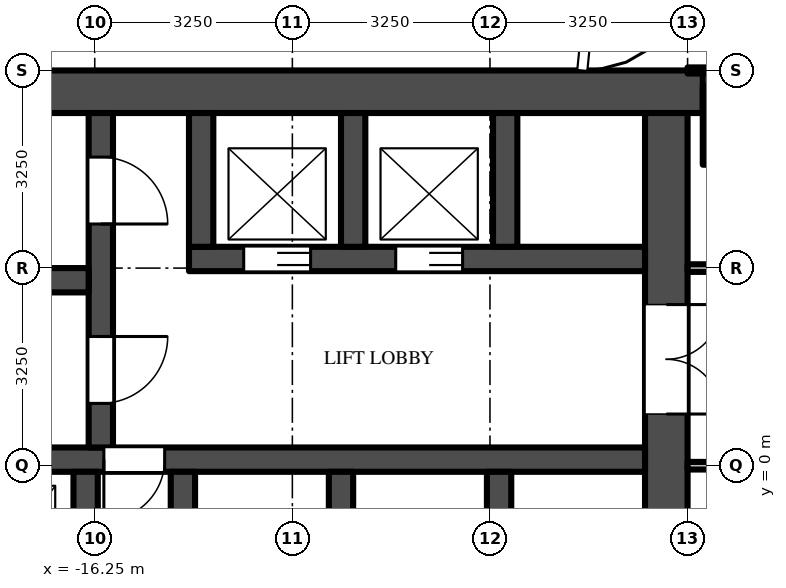
"""IFC4 building model, lengths in metres.
Left out: names, types, materials, properties, quantities, classifications, styles, units other than length and angle.
Written with IfcOpenShell. Run it as: python <this file> out.ifc"""

import sys

from ifc_helpers import new_model, si_unit, direction, frame, frame_2d, origin, origin_2d, place, context, subcontext, project, spatial, rectangle, extrude, source, transform, mapped, element, fill, save


model = new_model("IFC4")
c1 = context("Model", 3, precision=1e-05, world=origin(), true_north=direction((0.0, 1.0)))
c2 = subcontext(c1, "Body", "Model", "MODEL_VIEW")
j1 = project(units=[si_unit("LENGTHUNIT", "METRE"), si_unit("PLANEANGLEUNIT", "RADIAN")], contexts=[c1])
p1 = place(None, origin())
s1 = spatial("IfcSite", under=j1, at=p1, CompositionType="ELEMENT")
p2 = place(p1, origin())
s2 = spatial("IfcBuilding", under=s1, at=p2, CompositionType="ELEMENT")
p3 = place(p2, frame((0.0, 0.0, 102.0)))
s3 = spatial("IfcBuildingStorey", under=s2, at=p3, CompositionType="ELEMENT", Elevation=102.0)
m1 = source(origin(), c2, "Body", "SweptSolid", [
    extrude(rectangle(XDim=1.3, YDim=1.3, at=origin_2d()), origin(), (0.0, 0.0, 1.0), 4.5),
])
p4 = place(p3, frame((-5.6, 5.6, 0.0), z_axis=(0.0, 0.0, 1.0), x_axis=(1.0, 0.0, 0.0)))
e1 = element("IfcColumn", 1, at=p4, inside=s3, PredefinedType="COLUMN", context=c2, shape_type="MappedRepresentation", body=[
    mapped(m1, transform((0.0, 0.0, 0.0))),
])
m2 = source(origin(), c2, "Body", "SweptSolid", [
    extrude(rectangle(XDim=16.5, YDim=0.7, at=frame_2d((8.25, 0.0))), origin(), (0.0, 0.0, 1.0), 4.25),
])
p5 = place(p3, frame((-6.25, 6.15, 0.0), z_axis=(0.0, 0.0, 1.0), x_axis=(-1.0, 0.0, 0.0)))
e2 = element("IfcWall", 2, at=p5, inside=s3, PredefinedType="SHEAR", context=c2, shape_type="MappedRepresentation", body=[
    mapped(m2, transform((0.0, 0.0, 0.0))),
])
m3 = source(origin(), c2, "Body", "SweptSolid", [
    extrude(rectangle(XDim=9.05, YDim=0.7, at=frame_2d((4.525, 0.0))), origin(), (0.0, 0.0, 1.0), 4.25),
])
p6 = place(p3, frame((-6.85, 5.8, 0.0), z_axis=(0.0, 0.0, 1.0), x_axis=(0.0, -1.0, 0.0)))
e3 = element("IfcWall", 3, at=p6, inside=s3, PredefinedType="SHEAR", context=c2, shape_type="MappedRepresentation", body=[
    mapped(m3, transform((0.0, 0.0, 0.0))),
])
m4 = source(origin(), c2, "Body", "SweptSolid", [
    extrude(rectangle(XDim=1.8, YDim=2.1, at=frame_2d((0.9, 1.05))), frame((0.0, 0.36, 0.0), z_axis=(0.0, -1.0, 0.0), x_axis=(1.0, 0.0, 0.0)), (0.0, 0.0, 1.0), 0.72),
])
p7 = place(p6, frame((3.15, 0.0, 0.0)))
e4 = element("IfcOpeningElement", 4, at=p7, cuts=e3, PredefinedType="OPENING", context=c2, shape_type="MappedRepresentation", body=[
    mapped(m4, transform((0.0, 0.0, 0.0))),
])
m5 = source(origin(), c2, "Body", "SweptSolid", [
    extrude(rectangle(XDim=7.5, YDim=0.4, at=frame_2d((3.75, 0.0))), origin(), (0.0, 0.0, 1.0), 4.25),
])
p8 = place(p3, frame((-7.2, 3.4, 0.0), z_axis=(0.0, 0.0, 1.0), x_axis=(-1.0, 0.0, 0.0)))
e5 = element("IfcWall", 5, at=p8, inside=s3, PredefinedType="SHEAR", context=c2, shape_type="MappedRepresentation", body=[
    mapped(m5, transform((0.0, 0.0, 0.0))),
])
m6 = source(origin(), c2, "Body", "SweptSolid", [
    extrude(rectangle(XDim=1.1, YDim=2.1, at=frame_2d((0.55, 1.05))), frame((0.0, 0.21, 0.0), z_axis=(0.0, -1.0, 0.0), x_axis=(1.0, 0.0, 0.0)), (0.0, 0.0, 1.0), 0.42),
])
p9 = place(p8, frame((3.0, 0.0, 0.0)))
e6 = element("IfcOpeningElement", 6, at=p9, cuts=e5, PredefinedType="OPENING", context=c2, shape_type="MappedRepresentation", body=[
    mapped(m6, transform((0.0, 0.0, 0.0))),
])
p10 = place(p8, frame((5.5, 0.0, 0.0)))
e7 = element("IfcOpeningElement", 7, at=p10, cuts=e5, PredefinedType="OPENING", context=c2, shape_type="MappedRepresentation", body=[
    mapped(m6, transform((0.0, 0.0, 0.0))),
])
m7 = source(origin(), c2, "Body", "SweptSolid", [
    extrude(rectangle(XDim=14.85, YDim=0.4, at=frame_2d((7.425, 0.0))), origin(), (0.0, 0.0, 1.0), 4.25),
])
p11 = place(p3, frame((-7.2, 0.1, 0.0), z_axis=(0.0, 0.0, 1.0), x_axis=(-1.0, 0.0, 0.0)))
e8 = element("IfcWall", 8, at=p11, inside=s3, PredefinedType="SHEAR", context=c2, shape_type="MappedRepresentation", body=[
    mapped(m7, transform((0.0, 0.0, 0.0))),
])
m8 = source(origin(), c2, "Body", "SweptSolid", [
    extrude(rectangle(XDim=1.0, YDim=2.1, at=frame_2d((0.5, 1.05))), frame((0.0, 0.21, 0.0), z_axis=(0.0, -1.0, 0.0), x_axis=(1.0, 0.0, 0.0)), (0.0, 0.0, 1.0), 0.42),
])
p12 = place(p11, frame((7.9, 0.0, 0.0)))
e9 = element("IfcOpeningElement", 9, at=p12, cuts=e8, PredefinedType="OPENING", context=c2, shape_type="MappedRepresentation", body=[
    mapped(m8, transform((0.0, 0.0, 0.0))),
])
m9 = source(origin(), c2, "Body", "SweptSolid", [
    extrude(rectangle(XDim=5.5, YDim=0.4, at=frame_2d((2.75, 0.0))), origin(), (0.0, 0.0, 1.0), 4.25),
])
p13 = place(p3, frame((-16.15, 5.8, 0.0), z_axis=(0.0, 0.0, 1.0), x_axis=(0.0, -1.0, 0.0)))
e10 = element("IfcWall", 10, at=p13, inside=s3, PredefinedType="SHEAR", context=c2, shape_type="MappedRepresentation", body=[
    mapped(m9, transform((0.0, 0.0, 0.0))),
])
p14 = place(p13, frame((0.725, 0.0, 0.0)))
e11 = element("IfcOpeningElement", 11, at=p14, cuts=e10, PredefinedType="OPENING", context=c2, shape_type="MappedRepresentation", body=[
    mapped(m6, transform((0.0, 0.0, 0.0))),
])
p15 = place(p13, frame((3.675, 0.0, 0.0)))
e12 = element("IfcOpeningElement", 12, at=p15, cuts=e10, PredefinedType="OPENING", context=c2, shape_type="MappedRepresentation", body=[
    mapped(m6, transform((0.0, 0.0, 0.0))),
])
m10 = source(origin(), c2, "Body", "SweptSolid", [
    extrude(rectangle(XDim=5.7, YDim=0.4, at=frame_2d((2.85, 0.0))), origin(), (0.0, 0.0, 1.0), 4.25),
])
p16 = place(p3, frame((-16.35, 3.05, 0.0), z_axis=(0.0, 0.0, 1.0), x_axis=(-1.0, 0.0, 0.0)))
e13 = element("IfcWall", 13, at=p16, inside=s3, PredefinedType="SHEAR", context=c2, shape_type="MappedRepresentation", body=[
    mapped(m10, transform((0.0, 0.0, 0.0))),
])
m11 = source(origin(), c2, "Body", "SweptSolid", [
    extrude(rectangle(XDim=2.2, YDim=0.4, at=frame_2d((1.1, 0.0))), origin(), (0.0, 0.0, 1.0), 4.25),
])
for number, where, z_axis, x_axis in (
    (14, (-9.5, 5.8, 0.0), (0.0, 0.0, 1.0), (0.0, -1.0, 0.0)),
    (15, (-12.0, 5.8, 0.0), (0.0, 0.0, 1.0), (0.0, -1.0, 0.0)),
    (16, (-14.5, 5.8, 0.0), (0.0, 0.0, 1.0), (0.0, -1.0, 0.0)),
):
    element("IfcWall", number, at=place(p3, frame(where, z_axis=z_axis, x_axis=x_axis)), inside=s3, PredefinedType="SHEAR", context=c2, shape_type="MappedRepresentation", body=[
        mapped(m11, transform((0.0, 0.0, 0.0))),
    ])
m12 = source(origin(), c2, "Body", "SweptSolid", [
    extrude(rectangle(XDim=2.45, YDim=0.4, at=frame_2d((1.225, 0.0))), origin(), (0.0, 0.0, 1.0), 4.25),
])
for number, where, z_axis, x_axis in (
    (17, (-9.6, -0.1, 0.0), (0.0, 0.0, 1.0), (0.0, -1.0, 0.0)),
    (18, (-12.2, -0.1, 0.0), (0.0, 0.0, 1.0), (0.0, -1.0, 0.0)),
    (19, (-14.8, -0.1, 0.0), (0.0, 0.0, 1.0), (0.0, -1.0, 0.0)),
    (20, (-16.4, -0.1, 0.0), (0.0, 0.0, 1.0), (0.0, -1.0, 0.0)),
):
    element("IfcWall", number, at=place(p3, frame(where, z_axis=z_axis, x_axis=x_axis)), inside=s3, PredefinedType="SHEAR", context=c2, shape_type="MappedRepresentation", body=[
        mapped(m12, transform((0.0, 0.0, 0.0))),
    ])
m13 = source(origin(), c2, "Body", "SweptSolid", [
    extrude(rectangle(XDim=5.363, YDim=0.125, at=frame_2d((2.681, 0.0))), origin(), (0.0, 0.0, 1.0), 3.468),
])
p17 = place(p3, frame((-1.137, 0.0, 0.0), z_axis=(0.0, 0.0, 1.0), x_axis=(-1.0, 0.0, 0.0)))
e21 = element("IfcWall", 21, at=p17, inside=s3, PredefinedType="PARTITIONING", context=c2, shape_type="MappedRepresentation", body=[
    mapped(m13, transform((0.0, 0.0, 0.0))),
])
p18 = place(p3, frame((-6.5, 3.25, 0.0), z_axis=(0.0, 0.0, 1.0), x_axis=(1.0, 0.0, 0.0)))
e22 = element("IfcWall", 22, at=p18, inside=s3, PredefinedType="PARTITIONING", context=c2, shape_type="MappedRepresentation", body=[
    mapped(m13, transform((0.0, 0.0, 0.0))),
])
m14 = source(origin(), c2, "Body", "SweptSolid", [
    extrude(rectangle(XDim=1.0, YDim=2.1, at=frame_2d((0.5, 1.05))), frame((0.0, 0.073, 0.0), z_axis=(0.0, -1.0, 0.0), x_axis=(1.0, 0.0, 0.0)), (0.0, 0.0, 1.0), 0.145),
])
p19 = place(p18, frame((3.95, 0.0, 0.0)))
e23 = element("IfcOpeningElement", 23, at=p19, cuts=e22, PredefinedType="OPENING", context=c2, shape_type="MappedRepresentation", body=[
    mapped(m14, transform((0.0, 0.0, 0.0))),
])
m15 = source(origin(), c2, "Body", "SweptSolid", [
    extrude(rectangle(XDim=5.363, YDim=0.1, at=frame_2d((2.681, 0.0))), origin(), (0.0, 0.0, 1.0), 3.33),
])
p20 = place(p3, frame((-6.5, 6.5, 0.0), z_axis=(0.0, 0.0, 1.0), x_axis=(1.0, 0.0, 0.0)))
e24 = element("IfcWall", 24, at=p20, inside=s3, PredefinedType="PARTITIONING", context=c2, shape_type="MappedRepresentation", body=[
    mapped(m15, transform((0.0, 0.0, 0.0))),
])
m16 = source(origin(), c2, "Body", "SweptSolid", [
    extrude(rectangle(XDim=1.1, YDim=2.1, at=frame_2d((0.55, 1.05))), frame((0.0, 0.025, 0.0), z_axis=(0.0, -1.0, 0.0), x_axis=(1.0, 0.0, 0.0)), (0.0, 0.0, 1.0), 0.05),
])
p21 = place(p9, origin())
e25 = element("IfcDoor", 25, at=p21, inside=s3, OperationType="DOUBLE_DOOR_SLIDING", PredefinedType="DOOR", context=c2, shape_type="MappedRepresentation", body=[
    mapped(m16, transform((0.0, 0.0, 0.0))),
])
fill(e6, e25)
p22 = place(p10, origin())
e26 = element("IfcDoor", 26, at=p22, inside=s3, OperationType="DOUBLE_DOOR_SLIDING", PredefinedType="DOOR", context=c2, shape_type="MappedRepresentation", body=[
    mapped(m16, transform((0.0, 0.0, 0.0))),
])
fill(e7, e26)
m17 = source(origin(), c2, "Body", "SweptSolid", [
    extrude(rectangle(XDim=1.8, YDim=2.1, at=frame_2d((0.9, 1.05))), frame((0.0, -0.275, 0.0), z_axis=(0.0, -1.0, 0.0), x_axis=(1.0, 0.0, 0.0)), (0.0, 0.0, 1.0), 0.05),
])
p23 = place(p7, origin())
e27 = element("IfcDoor", 27, at=p23, inside=s3, OperationType="DOUBLE_DOOR_SINGLE_SWING", PredefinedType="DOOR", context=c2, shape_type="MappedRepresentation", body=[
    mapped(m17, transform((0.0, 0.0, 0.0))),
])
fill(e4, e27)
p24 = place(p14, origin())
e28 = element("IfcDoor", 28, at=p24, inside=s3, OperationType="SINGLE_SWING_RIGHT", PredefinedType="DOOR", context=c2, shape_type="MappedRepresentation", body=[
    mapped(m16, transform((0.0, 0.0, 0.0))),
])
fill(e11, e28)
p25 = place(p15, origin())
e29 = element("IfcDoor", 29, at=p25, inside=s3, OperationType="SINGLE_SWING_LEFT", PredefinedType="DOOR", context=c2, shape_type="MappedRepresentation", body=[
    mapped(m16, transform((0.0, 0.0, 0.0))),
])
fill(e12, e29)
m18 = source(origin(), c2, "Body", "SweptSolid", [
    extrude(rectangle(XDim=1.0, YDim=2.1, at=frame_2d((0.5, 1.05))), frame((0.0, 0.025, 0.0), z_axis=(0.0, -1.0, 0.0), x_axis=(1.0, 0.0, 0.0)), (0.0, 0.0, 1.0), 0.05),
])
p26 = place(p12, origin())
e30 = element("IfcDoor", 30, at=p26, inside=s3, OperationType="SINGLE_SWING_RIGHT", PredefinedType="DOOR", context=c2, shape_type="MappedRepresentation", body=[
    mapped(m18, transform((0.0, 0.0, 0.0))),
])
fill(e9, e30)
save(model, sys.argv[1])
